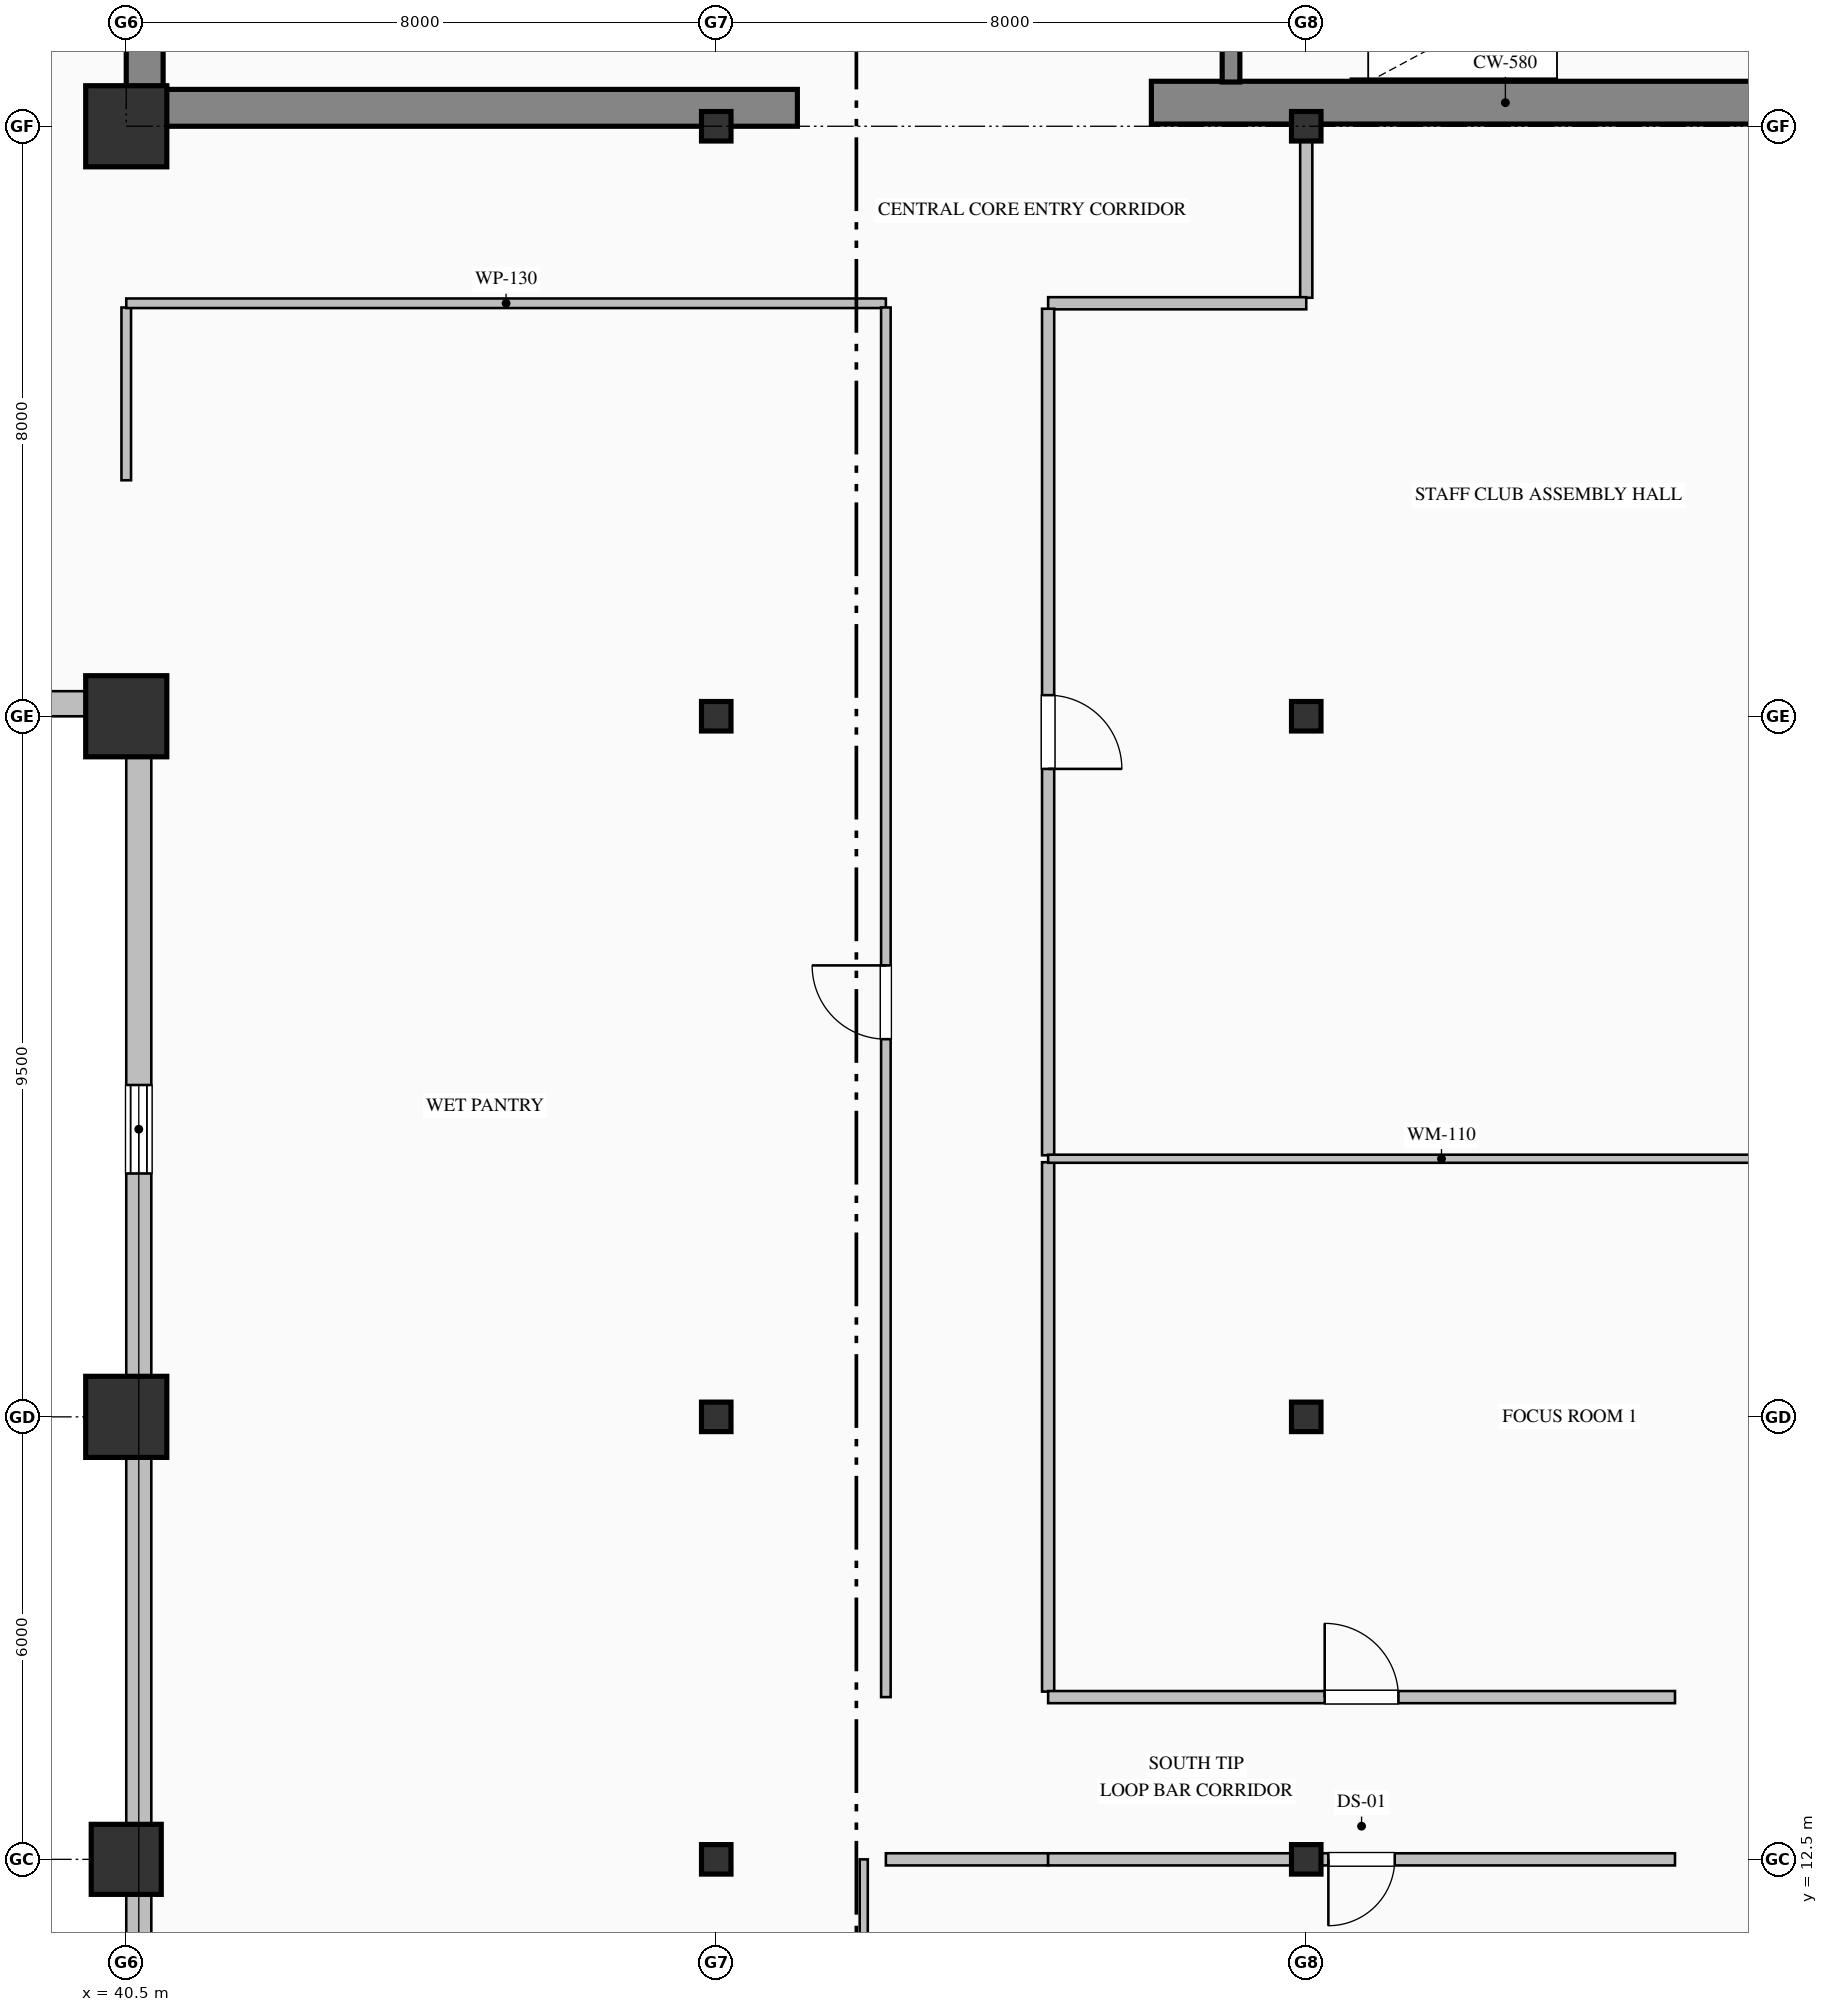
"""IFC4 building model, lengths in metres.
Left out: names, types, materials, properties, quantities, classifications, styles, units other than length and angle.
Written with IfcOpenShell. Run it as: python <this file> out.ifc"""

import sys

from ifc_helpers import new_model, si_unit, direction, frame, frame_2d, origin, origin_2d, place, context, subcontext, project, spatial, rectangle, hollow_rectangle, i_section, extrude, element, fill, save


model = new_model("IFC4")
c1 = context("Model", 3, precision=1e-05, world=origin(), true_north=direction((0.0, 1.0)))
c2 = subcontext(c1, "Body", "Model", "MODEL_VIEW")
j1 = project(units=[si_unit("LENGTHUNIT", "METRE"), si_unit("PLANEANGLEUNIT", "RADIAN")], contexts=[c1])
p1 = place(None, origin())
s1 = spatial("IfcSite", under=j1, at=p1, CompositionType="ELEMENT")
p2 = place(p1, origin())
s2 = spatial("IfcBuilding", under=s1, at=p2, CompositionType="ELEMENT")
p3 = place(p2, frame((0.0, 0.0, 147.0)))
s3 = spatial("IfcBuildingStorey", under=s2, at=p3, CompositionType="ELEMENT", Elevation=147.0)
p4 = place(p3, frame((40.75, 36.5, 0.0), z_axis=(0.0, 0.0, 1.0), x_axis=(0.0, 1.0, 0.0)))
e1 = element("IfcWall", 1, at=p4, inside=s3, PredefinedType="SHEAR", context=c2, shape_type="SweptSolid", body=[
    extrude(rectangle(XDim=7.9, YDim=0.5, at=frame_2d((3.95, 0.0))), origin(), (0.0, 0.0, 1.0), 3.765),
])
p5 = place(p3, frame((40.5, 36.25, 0.0), z_axis=(0.0, 0.0, 1.0), x_axis=(1.0, 0.0, 0.0)))
e2 = element("IfcWall", 2, at=p5, inside=s3, PredefinedType="SHEAR", context=c2, shape_type="SweptSolid", body=[
    extrude(rectangle(XDim=9.1, YDim=0.5, at=frame_2d((4.55, 0.0))), origin(), (0.0, 0.0, 1.0), 3.765),
])
p6 = place(p3, frame((54.4, 36.32, 0.0), z_axis=(0.0, 0.0, 1.0), x_axis=(1.0, 0.0, 0.0)))
e3 = element("IfcWall", 3, at=p6, inside=s3, PredefinedType="SHEAR", context=c2, shape_type="SweptSolid", body=[
    extrude(rectangle(XDim=9.6, YDim=0.58, at=frame_2d((4.8, 0.0))), origin(), (0.0, 0.0, 1.0), 4.0),
])
p7 = place(p3, frame((40.5, 12.5, 0.0), z_axis=(0.0, 0.0, 1.0), x_axis=(1.0, 0.0, 0.0)))
e4 = element("IfcColumn", 4, at=p7, inside=s3, PredefinedType="COLUMN", context=c2, shape_type="SweptSolid", body=[
    extrude(hollow_rectangle(XDim=0.95, YDim=0.95, WallThickness=0.036, at=origin_2d()), origin(), (0.0, 0.0, 1.0), 4.0),
])
for number, where, z_axis, x_axis in (
    (5, (40.5, 18.5, 0.0), (0.0, 0.0, 1.0), (1.0, 0.0, 0.0)),
    (6, (40.5, 28.0, 0.0), (0.0, 0.0, 1.0), (1.0, 0.0, 0.0)),
    (7, (40.5, 36.0, 0.0), (0.0, 0.0, 1.0), (1.0, 0.0, 0.0)),
):
    element("IfcColumn", number, at=place(p3, frame(where, z_axis=z_axis, x_axis=x_axis)), inside=s3, PredefinedType="COLUMN", context=c2, shape_type="SweptSolid", body=[
        extrude(hollow_rectangle(XDim=1.1, YDim=1.1, WallThickness=0.04, at=origin_2d()), origin(), (0.0, 0.0, 1.0), 4.0),
    ])
for number, where, z_axis, x_axis in (
    (8, (48.5, 12.5, 0.0), (0.0, 0.0, 1.0), (1.0, 0.0, 0.0)),
    (9, (48.5, 18.5, 0.0), (0.0, 0.0, 1.0), (1.0, 0.0, 0.0)),
    (10, (48.5, 28.0, 0.0), (0.0, 0.0, 1.0), (1.0, 0.0, 0.0)),
    (11, (48.5, 36.0, 0.0), (0.0, 0.0, 1.0), (1.0, 0.0, 0.0)),
    (12, (56.5, 12.5, 0.0), (0.0, 0.0, 1.0), (1.0, 0.0, 0.0)),
    (13, (56.5, 18.5, 0.0), (0.0, 0.0, 1.0), (1.0, 0.0, 0.0)),
    (14, (56.5, 28.0, 0.0), (0.0, 0.0, 1.0), (1.0, 0.0, 0.0)),
    (15, (56.5, 36.0, 0.0), (0.0, 0.0, 1.0), (1.0, 0.0, 0.0)),
):
    element("IfcColumn", number, at=place(p3, frame(where, z_axis=z_axis, x_axis=x_axis)), inside=s3, PredefinedType="COLUMN", context=c2, shape_type="SweptSolid", body=[
        extrude(i_section(OverallWidth=0.4, OverallDepth=0.4, WebThickness=0.013, FlangeThickness=0.021, FilletRadius=0.022, at=origin_2d()), origin(), (0.0, 0.0, 1.0), 4.0),
    ])
p8 = place(p3, frame((40.67, 8.0, 0.0), z_axis=(0.0, 0.0, 1.0), x_axis=(0.0, 1.0, 0.0)))
e16 = element("IfcWall", 16, at=p8, inside=s3, PredefinedType="SOLIDWALL", context=c2, shape_type="SweptSolid", body=[
    extrude(rectangle(XDim=20.34, YDim=0.34, at=frame_2d((10.17, 0.0))), origin(), (0.0, 0.0, 1.0), 3.165),
])
p9 = place(p8, frame((13.8, 0.0, 0.7)))
e17 = element("IfcOpeningElement", 17, at=p9, cuts=e16, PredefinedType="OPENING", context=c2, shape_type="SweptSolid", body=[
    extrude(rectangle(XDim=1.2, YDim=1.85, at=frame_2d((0.6, 0.925))), frame((0.0, 0.18, 0.0), z_axis=(0.0, -1.0, 0.0), x_axis=(1.0, 0.0, 0.0)), (0.0, 0.0, 1.0), 0.36),
])
p10 = place(p3, frame((40.52, 28.17, 0.0), z_axis=(0.0, 0.0, 1.0), x_axis=(-1.0, 0.0, 0.0)))
e18 = element("IfcWall", 18, at=p10, inside=s3, PredefinedType="SOLIDWALL", context=c2, shape_type="SweptSolid", body=[
    extrude(rectangle(XDim=27.52, YDim=0.34, at=frame_2d((13.76, 0.0))), origin(), (0.0, 0.0, 1.0), 3.165),
])
p11 = place(p10, frame((2.85, 0.0, 0.85)))
e19 = element("IfcOpeningElement", 19, at=p11, cuts=e18, PredefinedType="OPENING", context=c2, shape_type="SweptSolid", body=[
    extrude(rectangle(XDim=1.5, YDim=1.95, at=frame_2d((0.75, 0.975))), frame((0.0, 0.18, 0.0), z_axis=(0.0, -1.0, 0.0), x_axis=(1.0, 0.0, 0.0)), (0.0, 0.0, 1.0), 0.36),
])
p12 = place(p10, frame((10.2, 0.0, 0.7)))
e20 = element("IfcOpeningElement", 20, at=p12, cuts=e18, PredefinedType="OPENING", context=c2, shape_type="SweptSolid", body=[
    extrude(rectangle(XDim=1.2, YDim=1.85, at=frame_2d((0.6, 0.925))), frame((0.0, 0.18, 0.0), z_axis=(0.0, -1.0, 0.0), x_axis=(1.0, 0.0, 0.0)), (0.0, 0.0, 1.0), 0.36),
])
p13 = place(p10, frame((13.65, 0.0, 0.85)))
e21 = element("IfcOpeningElement", 21, at=p13, cuts=e18, PredefinedType="OPENING", context=c2, shape_type="SweptSolid", body=[
    extrude(rectangle(XDim=1.5, YDim=1.95, at=frame_2d((0.75, 0.975))), frame((0.0, 0.18, 0.0), z_axis=(0.0, -1.0, 0.0), x_axis=(1.0, 0.0, 0.0)), (0.0, 0.0, 1.0), 0.36),
])
p14 = place(p10, frame((17.175, 0.0, 0.85)))
e22 = element("IfcOpeningElement", 22, at=p14, cuts=e18, PredefinedType="OPENING", context=c2, shape_type="SweptSolid", body=[
    extrude(rectangle(XDim=1.65, YDim=1.95, at=frame_2d((0.825, 0.975))), frame((0.0, 0.18, 0.0), z_axis=(0.0, -1.0, 0.0), x_axis=(1.0, 0.0, 0.0)), (0.0, 0.0, 1.0), 0.36),
])
p15 = place(p10, frame((21.0, 0.0, 0.7)))
e23 = element("IfcOpeningElement", 23, at=p15, cuts=e18, PredefinedType="OPENING", context=c2, shape_type="SweptSolid", body=[
    extrude(rectangle(XDim=1.2, YDim=1.85, at=frame_2d((0.6, 0.925))), frame((0.0, 0.18, 0.0), z_axis=(0.0, -1.0, 0.0), x_axis=(1.0, 0.0, 0.0)), (0.0, 0.0, 1.0), 0.36),
])
p16 = place(p3, frame((55.48, 39.75, 0.0), z_axis=(0.0, 0.0, 1.0), x_axis=(0.0, -1.0, 0.0)))
e24 = element("IfcWall", 24, at=p16, inside=s3, PredefinedType="SOLIDWALL", context=c2, shape_type="SweptSolid", body=[
    extrude(rectangle(XDim=3.15, YDim=0.24, at=frame_2d((1.575, 0.0))), origin(), (0.0, 0.0, 1.0), 4.0),
])
p17 = place(p16, frame((1.0, 0.0, 0.0)))
e25 = element("IfcOpeningElement", 25, at=p17, cuts=e24, PredefinedType="OPENING", context=c2, shape_type="SweptSolid", body=[
    extrude(rectangle(XDim=1.15, YDim=2.2, at=frame_2d((0.575, 1.1))), frame((0.0, 0.13, 0.0), z_axis=(0.0, -1.0, 0.0), x_axis=(1.0, 0.0, 0.0)), (0.0, 0.0, 1.0), 0.26),
])
p18 = place(p3, frame((40.5, 33.543, 0.0), z_axis=(0.0, 0.0, 1.0), x_axis=(0.0, -1.0, 0.0)))
e26 = element("IfcWall", 26, at=p18, inside=s3, PredefinedType="PARTITIONING", context=c2, shape_type="SweptSolid", body=[
    extrude(rectangle(XDim=2.343, YDim=0.13, at=frame_2d((1.171, 0.0))), origin(), (0.0, 0.0, 1.0), 3.157),
])
p19 = place(p3, frame((56.5, 36.0, 0.0), z_axis=(0.0, 0.0, 1.0), x_axis=(0.0, -1.0, 0.0)))
e27 = element("IfcWall", 27, at=p19, inside=s3, PredefinedType="PARTITIONING", context=c2, shape_type="SweptSolid", body=[
    extrude(rectangle(XDim=2.325, YDim=0.165, at=frame_2d((1.163, 0.0))), origin(), (0.0, 0.0, 1.0), 3.157),
])
p20 = place(p3, frame((56.5, 33.6, 0.0), z_axis=(0.0, 0.0, 1.0), x_axis=(-1.0, 0.0, 0.0)))
e28 = element("IfcWall", 28, at=p20, inside=s3, PredefinedType="PARTITIONING", context=c2, shape_type="SweptSolid", body=[
    extrude(rectangle(XDim=3.5, YDim=0.165, at=frame_2d((1.75, 0.0))), origin(), (0.0, 0.0, 1.0), 3.765),
])
p21 = place(p3, frame((50.8, 33.6, 0.0), z_axis=(0.0, 0.0, 1.0), x_axis=(-1.0, 0.0, 0.0)))
e29 = element("IfcWall", 29, at=p21, inside=s3, PredefinedType="PARTITIONING", context=c2, shape_type="SweptSolid", body=[
    extrude(rectangle(XDim=10.3, YDim=0.13, at=frame_2d((5.15, 0.0))), origin(), (0.0, 0.0, 1.0), 3.765),
])
p22 = place(p3, frame((53.0, 33.525, 0.0), z_axis=(0.0, 0.0, 1.0), x_axis=(0.0, -1.0, 0.0)))
e30 = element("IfcWall", 30, at=p22, inside=s3, PredefinedType="PARTITIONING", context=c2, shape_type="SweptSolid", body=[
    extrude(rectangle(XDim=11.478, YDim=0.165, at=frame_2d((5.739, 0.0))), origin(), (0.0, 0.0, 1.0), 3.765),
])
p23 = place(p22, frame((5.239, 0.0, 0.0)))
e31 = element("IfcOpeningElement", 31, at=p23, cuts=e30, PredefinedType="OPENING", context=c2, shape_type="SweptSolid", body=[
    extrude(rectangle(XDim=1.0, YDim=2.15, at=frame_2d((0.5, 1.075))), frame((0.0, 0.093, 0.0), z_axis=(0.0, -1.0, 0.0), x_axis=(1.0, 0.0, 0.0)), (0.0, 0.0, 1.0), 0.185),
])
p24 = place(p3, frame((53.0, 21.953, 0.0), z_axis=(0.0, 0.0, 1.0), x_axis=(0.0, -1.0, 0.0)))
e32 = element("IfcWall", 32, at=p24, inside=s3, PredefinedType="PARTITIONING", context=c2, shape_type="SweptSolid", body=[
    extrude(rectangle(XDim=7.178, YDim=0.165, at=frame_2d((3.589, 0.0))), origin(), (0.0, 0.0, 1.0), 3.765),
])
p25 = place(p3, frame((50.8, 14.7, 0.0), z_axis=(0.0, 0.0, 1.0), x_axis=(0.0, 1.0, 0.0)))
e33 = element("IfcWall", 33, at=p25, inside=s3, PredefinedType="PARTITIONING", context=c2, shape_type="SweptSolid", body=[
    extrude(rectangle(XDim=18.843, YDim=0.13, at=frame_2d((9.421, 0.0))), origin(), (0.0, 0.0, 1.0), 3.765),
])
p26 = place(p25, frame((8.921, 0.0, 0.0)))
e34 = element("IfcOpeningElement", 34, at=p26, cuts=e33, PredefinedType="OPENING", context=c2, shape_type="SweptSolid", body=[
    extrude(rectangle(XDim=1.0, YDim=2.15, at=frame_2d((0.5, 1.075))), frame((0.0, 0.075, 0.0), z_axis=(0.0, -1.0, 0.0), x_axis=(1.0, 0.0, 0.0)), (0.0, 0.0, 1.0), 0.15),
])
p27 = place(p3, frame((53.0, 12.5, 0.0), z_axis=(0.0, 0.0, 1.0), x_axis=(-1.0, 0.0, 0.0)))
e35 = element("IfcWall", 35, at=p27, inside=s3, PredefinedType="PARTITIONING", context=c2, shape_type="SweptSolid", body=[
    extrude(rectangle(XDim=2.2, YDim=0.165, at=frame_2d((1.1, 0.0))), origin(), (0.0, 0.0, 1.0), 3.157),
])
p28 = place(p3, frame((53.0, 14.7, 0.0), z_axis=(0.0, 0.0, 1.0), x_axis=(1.0, 0.0, 0.0)))
e36 = element("IfcWall", 36, at=p28, inside=s3, PredefinedType="PARTITIONING", context=c2, shape_type="SweptSolid", body=[
    extrude(rectangle(XDim=8.5, YDim=0.165, at=frame_2d((4.25, 0.0))), origin(), (0.0, 0.0, 1.0), 3.765),
])
p29 = place(p28, frame((3.75, 0.0, 0.0)))
e37 = element("IfcOpeningElement", 37, at=p29, cuts=e36, PredefinedType="OPENING", context=c2, shape_type="SweptSolid", body=[
    extrude(rectangle(XDim=1.0, YDim=2.15, at=frame_2d((0.5, 1.075))), frame((0.0, 0.093, 0.0), z_axis=(0.0, -1.0, 0.0), x_axis=(1.0, 0.0, 0.0)), (0.0, 0.0, 1.0), 0.185),
])
p30 = place(p3, frame((61.5, 12.5, 0.0), z_axis=(0.0, 0.0, 1.0), x_axis=(-1.0, 0.0, 0.0)))
e38 = element("IfcWall", 38, at=p30, inside=s3, PredefinedType="PARTITIONING", context=c2, shape_type="SweptSolid", body=[
    extrude(rectangle(XDim=8.5, YDim=0.165, at=frame_2d((4.25, 0.0))), origin(), (0.0, 0.0, 1.0), 3.157),
])
p31 = place(p30, frame((3.8, 0.0, 0.0)))
e39 = element("IfcOpeningElement", 39, at=p31, cuts=e38, PredefinedType="OPENING", context=c2, shape_type="SweptSolid", body=[
    extrude(rectangle(XDim=0.9, YDim=2.15, at=frame_2d((0.45, 1.075))), frame((0.0, 0.093, 0.0), z_axis=(0.0, -1.0, 0.0), x_axis=(1.0, 0.0, 0.0)), (0.0, 0.0, 1.0), 0.185),
])
p32 = place(p3, frame((63.668, 22.0, 0.0), z_axis=(0.0, 0.0, 1.0), x_axis=(-1.0, 0.0, 0.0)))
e40 = element("IfcWall", 40, at=p32, inside=s3, PredefinedType="MOVABLE", context=c2, shape_type="SweptSolid", body=[
    extrude(rectangle(XDim=10.668, YDim=0.11, at=frame_2d((5.334, 0.0))), origin(), (0.0, 0.0, 1.0), 3.765),
])
p33 = place(p3, frame((50.5, 12.5, 0.0), z_axis=(0.0, 0.0, 1.0), x_axis=(0.0, -1.0, 0.0)))
e41 = element("IfcWall", 41, at=p33, inside=s3, PredefinedType="MOVABLE", context=c2, shape_type="SweptSolid", body=[
    extrude(rectangle(XDim=8.168, YDim=0.11, at=frame_2d((4.084, 0.0))), origin(), (0.0, 0.0, 1.0), 3.765),
])
p34 = place(p33, frame((3.584, 0.0, 0.0)))
e42 = element("IfcOpeningElement", 42, at=p34, cuts=e41, PredefinedType="OPENING", context=c2, shape_type="SweptSolid", body=[
    extrude(rectangle(XDim=1.0, YDim=2.15, at=frame_2d((0.5, 1.075))), frame((0.0, 0.065, 0.0), z_axis=(0.0, -1.0, 0.0), x_axis=(1.0, 0.0, 0.0)), (0.0, 0.0, 1.0), 0.13),
])
p35 = place(p9, origin())
e43 = element("IfcWindow", 43, at=p35, inside=s3, PartitioningType="DOUBLE_PANEL_VERTICAL", PredefinedType="WINDOW", context=c2, shape_type="SweptSolid", body=[
    extrude(rectangle(XDim=1.2, YDim=1.85, at=frame_2d((0.6, 0.925))), frame((0.0, 0.15, 0.0), z_axis=(0.0, -1.0, 0.0), x_axis=(1.0, 0.0, 0.0)), (0.0, 0.0, 1.0), 0.06),
])
fill(e17, e43)
p36 = place(p23, origin())
e44 = element("IfcDoor", 44, at=p36, inside=s3, OperationType="SINGLE_SWING_RIGHT", PredefinedType="DOOR", context=c2, shape_type="SweptSolid", body=[
    extrude(rectangle(XDim=1.0, YDim=2.15, at=frame_2d((0.5, 1.075))), frame((0.0, 0.025, 0.0), z_axis=(0.0, -1.0, 0.0), x_axis=(1.0, 0.0, 0.0)), (0.0, 0.0, 1.0), 0.05),
])
fill(e31, e44)
p37 = place(p29, origin())
e45 = element("IfcDoor", 45, at=p37, inside=s3, OperationType="SINGLE_SWING_LEFT", PredefinedType="DOOR", context=c2, shape_type="SweptSolid", body=[
    extrude(rectangle(XDim=1.0, YDim=2.15, at=frame_2d((0.5, 1.075))), frame((0.0, 0.025, 0.0), z_axis=(0.0, -1.0, 0.0), x_axis=(1.0, 0.0, 0.0)), (0.0, 0.0, 1.0), 0.05),
])
fill(e37, e45)
p38 = place(p26, origin())
e46 = element("IfcDoor", 46, at=p38, inside=s3, OperationType="SINGLE_SWING_RIGHT", PredefinedType="DOOR", context=c2, shape_type="SweptSolid", body=[
    extrude(rectangle(XDim=1.0, YDim=2.15, at=frame_2d((0.5, 1.075))), frame((0.0, 0.025, 0.0), z_axis=(0.0, -1.0, 0.0), x_axis=(1.0, 0.0, 0.0)), (0.0, 0.0, 1.0), 0.05),
])
fill(e34, e46)
p39 = place(p31, origin())
e47 = element("IfcDoor", 47, at=p39, inside=s3, OperationType="SINGLE_SWING_RIGHT", PredefinedType="DOOR", context=c2, shape_type="SweptSolid", body=[
    extrude(rectangle(XDim=0.9, YDim=2.15, at=frame_2d((0.45, 1.075))), frame((0.0, 0.025, 0.0), z_axis=(0.0, -1.0, 0.0), x_axis=(1.0, 0.0, 0.0)), (0.0, 0.0, 1.0), 0.05),
])
fill(e39, e47)
save(model, sys.argv[1])
